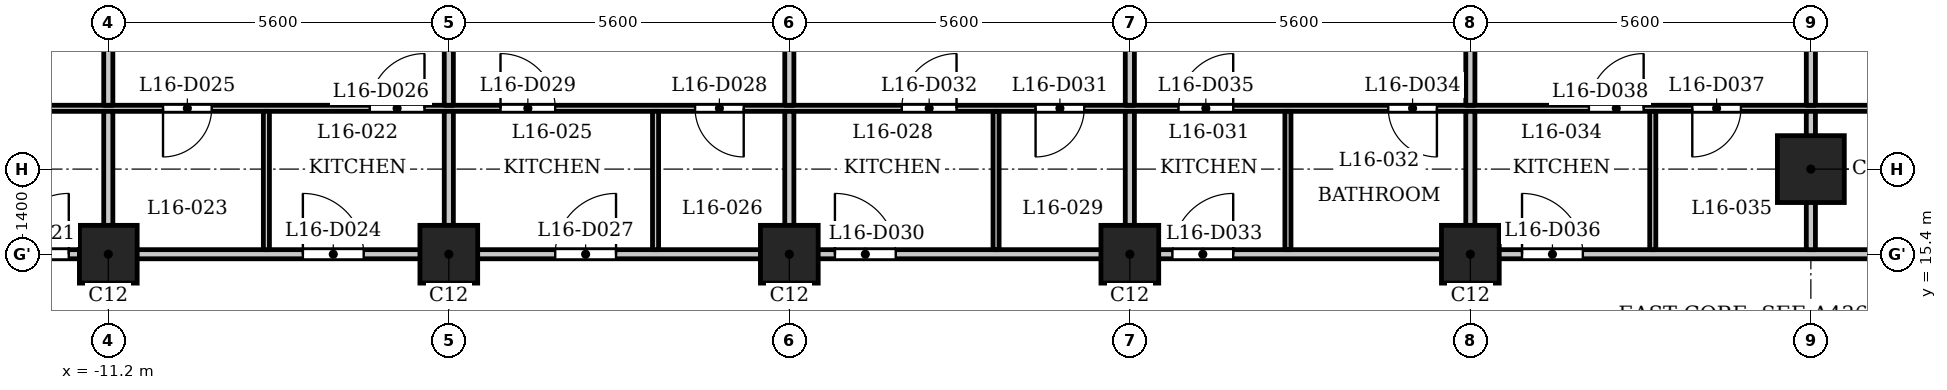
"""IFC4 building model, lengths in metres.
Left out: names, types, materials, properties, quantities, classifications, styles, units other than length and angle.
Written with IfcOpenShell. Run it as: python <this file> out.ifc"""

import sys

from ifc_helpers import new_model, si_unit, direction, frame, frame_2d, origin, origin_2d, place, context, subcontext, project, spatial, rectangle, extrude, element, fill, save


model = new_model("IFC4")
c1 = context("Model", 3, precision=1e-05, world=origin(), true_north=direction((0.0, 1.0)))
c2 = subcontext(c1, "Body", "Model", "MODEL_VIEW")
j1 = project(units=[si_unit("LENGTHUNIT", "METRE"), si_unit("PLANEANGLEUNIT", "RADIAN")], contexts=[c1])
p1 = place(None, origin())
s1 = spatial("IfcSite", under=j1, at=p1, CompositionType="ELEMENT")
p2 = place(p1, origin())
s2 = spatial("IfcBuilding", under=s1, at=p2, CompositionType="ELEMENT")
p3 = place(p2, frame((0.0, 0.0, 65.5)))
s3 = spatial("IfcBuildingStorey", under=s2, at=p3, CompositionType="ELEMENT", Elevation=65.5)
p4 = place(p3, frame((16.8, 16.8, 0.0), z_axis=(0.0, 0.0, 1.0), x_axis=(1.0, 0.0, 0.0)))
e1 = element("IfcColumn", 1, at=p4, inside=s3, PredefinedType="COLUMN", context=c2, shape_type="SweptSolid", body=[
    extrude(rectangle(XDim=1.1, YDim=1.1, at=origin_2d()), origin(), (0.0, 0.0, 1.0), 3.5),
])
for number, where, z_axis, x_axis in (
    (2, (-11.2, 15.4, 0.0), (0.0, 0.0, 1.0), (1.0, 0.0, 0.0)),
    (3, (-5.6, 15.4, 0.0), (0.0, 0.0, 1.0), (1.0, 0.0, 0.0)),
    (4, (0.0, 15.4, 0.0), (0.0, 0.0, 1.0), (1.0, 0.0, 0.0)),
    (5, (5.6, 15.4, 0.0), (0.0, 0.0, 1.0), (1.0, 0.0, 0.0)),
    (6, (11.2, 15.4, 0.0), (0.0, 0.0, 1.0), (1.0, 0.0, 0.0)),
):
    element("IfcColumn", number, at=place(p3, frame(where, z_axis=z_axis, x_axis=x_axis)), inside=s3, PredefinedType="COLUMN", context=c2, shape_type="SweptSolid", body=[
        extrude(rectangle(XDim=0.95, YDim=0.95, at=origin_2d()), origin(), (0.0, 0.0, 1.0), 3.5),
    ])
p5 = place(p3, frame((-27.484, 15.4, 0.0), z_axis=(0.0, 0.0, 1.0), x_axis=(1.0, 0.0, 0.0)))
e7 = element("IfcWall", 7, at=p5, inside=s3, PredefinedType="PARTITIONING", context=c2, shape_type="SweptSolid", body=[
    extrude(rectangle(XDim=54.968, YDim=0.15, at=frame_2d((27.484, 0.0))), origin(), (0.0, 0.0, 1.0), 3.2),
])
p6 = place(p5, frame((8.784, 0.0, 0.0)))
e8 = element("IfcOpeningElement", 8, at=p6, cuts=e7, PredefinedType="OPENING", context=c2, shape_type="SweptSolid", body=[
    extrude(rectangle(XDim=1.0, YDim=2.1, at=frame_2d((0.5, 1.05))), frame((0.0, 0.085, 0.0), z_axis=(0.0, -1.0, 0.0), x_axis=(1.0, 0.0, 0.0)), (0.0, 0.0, 1.0), 0.17),
])
p7 = place(p5, frame((14.634, 0.0, 0.0)))
e9 = element("IfcOpeningElement", 9, at=p7, cuts=e7, PredefinedType="OPENING", context=c2, shape_type="SweptSolid", body=[
    extrude(rectangle(XDim=1.0, YDim=2.1, at=frame_2d((0.5, 1.05))), frame((0.0, 0.085, 0.0), z_axis=(0.0, -1.0, 0.0), x_axis=(1.0, 0.0, 0.0)), (0.0, 0.0, 1.0), 0.17),
])
p8 = place(p5, frame((19.484, 0.0, 0.0)))
e10 = element("IfcOpeningElement", 10, at=p8, cuts=e7, PredefinedType="OPENING", context=c2, shape_type="SweptSolid", body=[
    extrude(rectangle(XDim=1.0, YDim=2.1, at=frame_2d((0.5, 1.05))), frame((0.0, 0.085, 0.0), z_axis=(0.0, -1.0, 0.0), x_axis=(1.0, 0.0, 0.0)), (0.0, 0.0, 1.0), 0.17),
])
p9 = place(p5, frame((23.634, 0.0, 0.0)))
e11 = element("IfcOpeningElement", 11, at=p9, cuts=e7, PredefinedType="OPENING", context=c2, shape_type="SweptSolid", body=[
    extrude(rectangle(XDim=1.0, YDim=2.1, at=frame_2d((0.5, 1.05))), frame((0.0, 0.085, 0.0), z_axis=(0.0, -1.0, 0.0), x_axis=(1.0, 0.0, 0.0)), (0.0, 0.0, 1.0), 0.17),
])
p10 = place(p5, frame((28.234, 0.0, 0.0)))
e12 = element("IfcOpeningElement", 12, at=p10, cuts=e7, PredefinedType="OPENING", context=c2, shape_type="SweptSolid", body=[
    extrude(rectangle(XDim=1.0, YDim=2.1, at=frame_2d((0.5, 1.05))), frame((0.0, 0.085, 0.0), z_axis=(0.0, -1.0, 0.0), x_axis=(1.0, 0.0, 0.0)), (0.0, 0.0, 1.0), 0.17),
])
p11 = place(p5, frame((33.784, 0.0, 0.0)))
e13 = element("IfcOpeningElement", 13, at=p11, cuts=e7, PredefinedType="OPENING", context=c2, shape_type="SweptSolid", body=[
    extrude(rectangle(XDim=1.0, YDim=2.1, at=frame_2d((0.5, 1.05))), frame((0.0, 0.085, 0.0), z_axis=(0.0, -1.0, 0.0), x_axis=(1.0, 0.0, 0.0)), (0.0, 0.0, 1.0), 0.17),
])
p12 = place(p5, frame((39.534, 0.0, 0.0)))
e14 = element("IfcOpeningElement", 14, at=p12, cuts=e7, PredefinedType="OPENING", context=c2, shape_type="SweptSolid", body=[
    extrude(rectangle(XDim=1.0, YDim=2.1, at=frame_2d((0.5, 1.05))), frame((0.0, 0.085, 0.0), z_axis=(0.0, -1.0, 0.0), x_axis=(1.0, 0.0, 0.0)), (0.0, 0.0, 1.0), 0.17),
])
p13 = place(p5, frame((48.234, 0.0, 0.0)))
e15 = element("IfcOpeningElement", 15, at=p13, cuts=e7, PredefinedType="OPENING", context=c2, shape_type="SweptSolid", body=[
    extrude(rectangle(XDim=1.0, YDim=2.1, at=frame_2d((0.5, 1.05))), frame((0.0, 0.085, 0.0), z_axis=(0.0, -1.0, 0.0), x_axis=(1.0, 0.0, 0.0)), (0.0, 0.0, 1.0), 0.17),
])
p14 = place(p3, frame((-26.64, 17.8, 0.0), z_axis=(0.0, 0.0, 1.0), x_axis=(1.0, 0.0, 0.0)))
e16 = element("IfcWall", 16, at=p14, inside=s3, PredefinedType="PARTITIONING", context=c2, shape_type="SweptSolid", body=[
    extrude(rectangle(XDim=53.034, YDim=0.1, at=frame_2d((26.517, 0.0))), origin(), (0.0, 0.0, 1.0), 3.2),
])
p15 = place(p14, frame((2.872, 0.0, 0.0)))
e17 = element("IfcOpeningElement", 17, at=p15, cuts=e16, PredefinedType="OPENING", context=c2, shape_type="SweptSolid", body=[
    extrude(rectangle(XDim=0.8, YDim=2.1, at=frame_2d((0.4, 1.05))), frame((0.0, 0.06, 0.0), z_axis=(0.0, -1.0, 0.0), x_axis=(1.0, 0.0, 0.0)), (0.0, 0.0, 1.0), 0.12),
])
p16 = place(p14, frame((7.04, 0.0, 0.0)))
e18 = element("IfcOpeningElement", 18, at=p16, cuts=e16, PredefinedType="OPENING", context=c2, shape_type="SweptSolid", body=[
    extrude(rectangle(XDim=0.9, YDim=2.1, at=frame_2d((0.45, 1.05))), frame((0.0, 0.06, 0.0), z_axis=(0.0, -1.0, 0.0), x_axis=(1.0, 0.0, 0.0)), (0.0, 0.0, 1.0), 0.12),
])
p17 = place(p14, frame((10.74, 0.0, 0.0)))
e19 = element("IfcOpeningElement", 19, at=p17, cuts=e16, PredefinedType="OPENING", context=c2, shape_type="SweptSolid", body=[
    extrude(rectangle(XDim=0.8, YDim=2.1, at=frame_2d((0.4, 1.05))), frame((0.0, 0.06, 0.0), z_axis=(0.0, -1.0, 0.0), x_axis=(1.0, 0.0, 0.0)), (0.0, 0.0, 1.0), 0.12),
])
p18 = place(p14, frame((12.89, 0.0, 0.0)))
e20 = element("IfcOpeningElement", 20, at=p18, cuts=e16, PredefinedType="OPENING", context=c2, shape_type="SweptSolid", body=[
    extrude(rectangle(XDim=0.9, YDim=2.1, at=frame_2d((0.45, 1.05))), frame((0.0, 0.06, 0.0), z_axis=(0.0, -1.0, 0.0), x_axis=(1.0, 0.0, 0.0)), (0.0, 0.0, 1.0), 0.12),
])
p19 = place(p14, frame((16.34, 0.0, 0.0)))
e21 = element("IfcOpeningElement", 21, at=p19, cuts=e16, PredefinedType="OPENING", context=c2, shape_type="SweptSolid", body=[
    extrude(rectangle(XDim=0.8, YDim=2.1, at=frame_2d((0.4, 1.05))), frame((0.0, 0.06, 0.0), z_axis=(0.0, -1.0, 0.0), x_axis=(1.0, 0.0, 0.0)), (0.0, 0.0, 1.0), 0.12),
])
p20 = place(p14, frame((19.74, 0.0, 0.0)))
e22 = element("IfcOpeningElement", 22, at=p20, cuts=e16, PredefinedType="OPENING", context=c2, shape_type="SweptSolid", body=[
    extrude(rectangle(XDim=0.9, YDim=2.1, at=frame_2d((0.45, 1.05))), frame((0.0, 0.06, 0.0), z_axis=(0.0, -1.0, 0.0), x_axis=(1.0, 0.0, 0.0)), (0.0, 0.0, 1.0), 0.12),
])
p21 = place(p14, frame((25.09, 0.0, 0.0)))
e23 = element("IfcOpeningElement", 23, at=p21, cuts=e16, PredefinedType="OPENING", context=c2, shape_type="SweptSolid", body=[
    extrude(rectangle(XDim=0.8, YDim=2.1, at=frame_2d((0.4, 1.05))), frame((0.0, 0.06, 0.0), z_axis=(0.0, -1.0, 0.0), x_axis=(1.0, 0.0, 0.0)), (0.0, 0.0, 1.0), 0.12),
])
p22 = place(p14, frame((21.89, 0.0, 0.0)))
e24 = element("IfcOpeningElement", 24, at=p22, cuts=e16, PredefinedType="OPENING", context=c2, shape_type="SweptSolid", body=[
    extrude(rectangle(XDim=0.9, YDim=2.1, at=frame_2d((0.45, 1.05))), frame((0.0, 0.06, 0.0), z_axis=(0.0, -1.0, 0.0), x_axis=(1.0, 0.0, 0.0)), (0.0, 0.0, 1.0), 0.12),
])
p23 = place(p14, frame((30.69, 0.0, 0.0)))
e25 = element("IfcOpeningElement", 25, at=p23, cuts=e16, PredefinedType="OPENING", context=c2, shape_type="SweptSolid", body=[
    extrude(rectangle(XDim=0.8, YDim=2.1, at=frame_2d((0.4, 1.05))), frame((0.0, 0.06, 0.0), z_axis=(0.0, -1.0, 0.0), x_axis=(1.0, 0.0, 0.0)), (0.0, 0.0, 1.0), 0.12),
])
p24 = place(p14, frame((28.49, 0.0, 0.0)))
e26 = element("IfcOpeningElement", 26, at=p24, cuts=e16, PredefinedType="OPENING", context=c2, shape_type="SweptSolid", body=[
    extrude(rectangle(XDim=0.9, YDim=2.1, at=frame_2d((0.45, 1.05))), frame((0.0, 0.06, 0.0), z_axis=(0.0, -1.0, 0.0), x_axis=(1.0, 0.0, 0.0)), (0.0, 0.0, 1.0), 0.12),
])
p25 = place(p14, frame((36.49, 0.0, 0.0)))
e27 = element("IfcOpeningElement", 27, at=p25, cuts=e16, PredefinedType="OPENING", context=c2, shape_type="SweptSolid", body=[
    extrude(rectangle(XDim=0.8, YDim=2.1, at=frame_2d((0.4, 1.05))), frame((0.0, 0.06, 0.0), z_axis=(0.0, -1.0, 0.0), x_axis=(1.0, 0.0, 0.0)), (0.0, 0.0, 1.0), 0.12),
])
p26 = place(p14, frame((33.04, 0.0, 0.0)))
e28 = element("IfcOpeningElement", 28, at=p26, cuts=e16, PredefinedType="OPENING", context=c2, shape_type="SweptSolid", body=[
    extrude(rectangle(XDim=0.9, YDim=2.1, at=frame_2d((0.45, 1.05))), frame((0.0, 0.06, 0.0), z_axis=(0.0, -1.0, 0.0), x_axis=(1.0, 0.0, 0.0)), (0.0, 0.0, 1.0), 0.12),
])
p27 = place(p14, frame((41.49, 0.0, 0.0)))
e29 = element("IfcOpeningElement", 29, at=p27, cuts=e16, PredefinedType="OPENING", context=c2, shape_type="SweptSolid", body=[
    extrude(rectangle(XDim=0.8, YDim=2.1, at=frame_2d((0.4, 1.05))), frame((0.0, 0.06, 0.0), z_axis=(0.0, -1.0, 0.0), x_axis=(1.0, 0.0, 0.0)), (0.0, 0.0, 1.0), 0.12),
])
p28 = place(p14, frame((39.79, 0.0, 0.0)))
e30 = element("IfcOpeningElement", 30, at=p28, cuts=e16, PredefinedType="OPENING", context=c2, shape_type="SweptSolid", body=[
    extrude(rectangle(XDim=0.9, YDim=2.1, at=frame_2d((0.45, 1.05))), frame((0.0, 0.06, 0.0), z_axis=(0.0, -1.0, 0.0), x_axis=(1.0, 0.0, 0.0)), (0.0, 0.0, 1.0), 0.12),
])
p29 = place(p14, frame((51.44, 0.0, 0.0)))
e31 = element("IfcOpeningElement", 31, at=p29, cuts=e16, PredefinedType="OPENING", context=c2, shape_type="SweptSolid", body=[
    extrude(rectangle(XDim=0.8, YDim=2.1, at=frame_2d((0.4, 1.05))), frame((0.0, 0.06, 0.0), z_axis=(0.0, -1.0, 0.0), x_axis=(1.0, 0.0, 0.0)), (0.0, 0.0, 1.0), 0.12),
])
p30 = place(p14, frame((46.49, 0.0, 0.0)))
e32 = element("IfcOpeningElement", 32, at=p30, cuts=e16, PredefinedType="OPENING", context=c2, shape_type="SweptSolid", body=[
    extrude(rectangle(XDim=0.9, YDim=2.1, at=frame_2d((0.45, 1.05))), frame((0.0, 0.06, 0.0), z_axis=(0.0, -1.0, 0.0), x_axis=(1.0, 0.0, 0.0)), (0.0, 0.0, 1.0), 0.12),
])
p31 = place(p3, frame((-11.2, 15.475, 0.0), z_axis=(0.0, 0.0, 1.0), x_axis=(0.0, 1.0, 0.0)))
e33 = element("IfcWall", 33, at=p31, inside=s3, PredefinedType="PARTITIONING", context=c2, shape_type="SweptSolid", body=[
    extrude(rectangle(XDim=2.275, YDim=0.15, at=frame_2d((1.137, 0.0))), origin(), (0.0, 0.0, 1.0), 3.2),
])
p32 = place(p3, frame((-11.2, 17.85, 0.0), z_axis=(0.0, 0.0, 1.0), x_axis=(0.0, 1.0, 0.0)))
e34 = element("IfcWall", 34, at=p32, inside=s3, PredefinedType="PARTITIONING", context=c2, shape_type="SweptSolid", body=[
    extrude(rectangle(XDim=5.23, YDim=0.15, at=frame_2d((2.615, 0.0))), origin(), (0.0, 0.0, 1.0), 3.2),
])
p33 = place(p3, frame((-8.6, 15.475, 0.0), z_axis=(0.0, 0.0, 1.0), x_axis=(0.0, 1.0, 0.0)))
e35 = element("IfcWall", 35, at=p33, inside=s3, PredefinedType="PARTITIONING", context=c2, shape_type="SweptSolid", body=[
    extrude(rectangle(XDim=2.275, YDim=0.1, at=frame_2d((1.137, 0.0))), origin(), (0.0, 0.0, 1.0), 3.2),
])
p34 = place(p3, frame((-5.6, 15.475, 0.0), z_axis=(0.0, 0.0, 1.0), x_axis=(0.0, 1.0, 0.0)))
e36 = element("IfcWall", 36, at=p34, inside=s3, PredefinedType="PARTITIONING", context=c2, shape_type="SweptSolid", body=[
    extrude(rectangle(XDim=2.275, YDim=0.15, at=frame_2d((1.137, 0.0))), origin(), (0.0, 0.0, 1.0), 3.2),
])
p35 = place(p3, frame((-5.6, 17.85, 0.0), z_axis=(0.0, 0.0, 1.0), x_axis=(0.0, 1.0, 0.0)))
e37 = element("IfcWall", 37, at=p35, inside=s3, PredefinedType="PARTITIONING", context=c2, shape_type="SweptSolid", body=[
    extrude(rectangle(XDim=5.23, YDim=0.15, at=frame_2d((2.615, 0.0))), origin(), (0.0, 0.0, 1.0), 3.2),
])
p36 = place(p3, frame((-2.2, 15.475, 0.0), z_axis=(0.0, 0.0, 1.0), x_axis=(0.0, 1.0, 0.0)))
e38 = element("IfcWall", 38, at=p36, inside=s3, PredefinedType="PARTITIONING", context=c2, shape_type="SweptSolid", body=[
    extrude(rectangle(XDim=2.275, YDim=0.1, at=frame_2d((1.137, 0.0))), origin(), (0.0, 0.0, 1.0), 3.2),
])
p37 = place(p3, frame((0.0, 15.475, 0.0), z_axis=(0.0, 0.0, 1.0), x_axis=(0.0, 1.0, 0.0)))
e39 = element("IfcWall", 39, at=p37, inside=s3, PredefinedType="PARTITIONING", context=c2, shape_type="SweptSolid", body=[
    extrude(rectangle(XDim=2.275, YDim=0.15, at=frame_2d((1.137, 0.0))), origin(), (0.0, 0.0, 1.0), 3.2),
])
p38 = place(p3, frame((0.0, 17.85, 0.0), z_axis=(0.0, 0.0, 1.0), x_axis=(0.0, 1.0, 0.0)))
e40 = element("IfcWall", 40, at=p38, inside=s3, PredefinedType="PARTITIONING", context=c2, shape_type="SweptSolid", body=[
    extrude(rectangle(XDim=5.23, YDim=0.15, at=frame_2d((2.615, 0.0))), origin(), (0.0, 0.0, 1.0), 3.2),
])
p39 = place(p3, frame((3.4, 15.475, 0.0), z_axis=(0.0, 0.0, 1.0), x_axis=(0.0, 1.0, 0.0)))
e41 = element("IfcWall", 41, at=p39, inside=s3, PredefinedType="PARTITIONING", context=c2, shape_type="SweptSolid", body=[
    extrude(rectangle(XDim=2.275, YDim=0.1, at=frame_2d((1.137, 0.0))), origin(), (0.0, 0.0, 1.0), 3.2),
])
p40 = place(p3, frame((5.6, 15.475, 0.0), z_axis=(0.0, 0.0, 1.0), x_axis=(0.0, 1.0, 0.0)))
e42 = element("IfcWall", 42, at=p40, inside=s3, PredefinedType="PARTITIONING", context=c2, shape_type="SweptSolid", body=[
    extrude(rectangle(XDim=2.275, YDim=0.15, at=frame_2d((1.137, 0.0))), origin(), (0.0, 0.0, 1.0), 3.2),
])
p41 = place(p3, frame((5.6, 17.85, 0.0), z_axis=(0.0, 0.0, 1.0), x_axis=(0.0, 1.0, 0.0)))
e43 = element("IfcWall", 43, at=p41, inside=s3, PredefinedType="PARTITIONING", context=c2, shape_type="SweptSolid", body=[
    extrude(rectangle(XDim=5.23, YDim=0.15, at=frame_2d((2.615, 0.0))), origin(), (0.0, 0.0, 1.0), 3.2),
])
p42 = place(p3, frame((8.2, 15.475, 0.0), z_axis=(0.0, 0.0, 1.0), x_axis=(0.0, 1.0, 0.0)))
e44 = element("IfcWall", 44, at=p42, inside=s3, PredefinedType="PARTITIONING", context=c2, shape_type="SweptSolid", body=[
    extrude(rectangle(XDim=2.275, YDim=0.1, at=frame_2d((1.137, 0.0))), origin(), (0.0, 0.0, 1.0), 3.2),
])
p43 = place(p3, frame((11.2, 15.475, 0.0), z_axis=(0.0, 0.0, 1.0), x_axis=(0.0, 1.0, 0.0)))
e45 = element("IfcWall", 45, at=p43, inside=s3, PredefinedType="PARTITIONING", context=c2, shape_type="SweptSolid", body=[
    extrude(rectangle(XDim=2.275, YDim=0.15, at=frame_2d((1.137, 0.0))), origin(), (0.0, 0.0, 1.0), 3.2),
])
p44 = place(p3, frame((11.2, 17.85, 0.0), z_axis=(0.0, 0.0, 1.0), x_axis=(0.0, 1.0, 0.0)))
e46 = element("IfcWall", 46, at=p44, inside=s3, PredefinedType="PARTITIONING", context=c2, shape_type="SweptSolid", body=[
    extrude(rectangle(XDim=5.23, YDim=0.15, at=frame_2d((2.615, 0.0))), origin(), (0.0, 0.0, 1.0), 3.2),
])
p45 = place(p3, frame((14.2, 15.475, 0.0), z_axis=(0.0, 0.0, 1.0), x_axis=(0.0, 1.0, 0.0)))
e47 = element("IfcWall", 47, at=p45, inside=s3, PredefinedType="PARTITIONING", context=c2, shape_type="SweptSolid", body=[
    extrude(rectangle(XDim=2.275, YDim=0.1, at=frame_2d((1.137, 0.0))), origin(), (0.0, 0.0, 1.0), 3.2),
])
p46 = place(p3, frame((16.8, 15.475, 0.0), z_axis=(0.0, 0.0, 1.0), x_axis=(0.0, 1.0, 0.0)))
e48 = element("IfcWall", 48, at=p46, inside=s3, PredefinedType="PARTITIONING", context=c2, shape_type="SweptSolid", body=[
    extrude(rectangle(XDim=2.275, YDim=0.15, at=frame_2d((1.137, 0.0))), origin(), (0.0, 0.0, 1.0), 3.2),
])
p47 = place(p3, frame((16.8, 17.85, 0.0), z_axis=(0.0, 0.0, 1.0), x_axis=(0.0, 1.0, 0.0)))
e49 = element("IfcWall", 49, at=p47, inside=s3, PredefinedType="PARTITIONING", context=c2, shape_type="SweptSolid", body=[
    extrude(rectangle(XDim=5.23, YDim=0.15, at=frame_2d((2.615, 0.0))), origin(), (0.0, 0.0, 1.0), 3.2),
])
p48 = place(p7, origin())
e50 = element("IfcDoor", 50, at=p48, inside=s3, OperationType="SINGLE_SWING_LEFT", PredefinedType="DOOR", context=c2, shape_type="SweptSolid", body=[
    extrude(rectangle(XDim=1.0, YDim=2.1, at=frame_2d((0.5, 1.05))), frame((0.0, 0.025, 0.0), z_axis=(0.0, -1.0, 0.0), x_axis=(1.0, 0.0, 0.0)), (0.0, 0.0, 1.0), 0.05),
])
fill(e9, e50)
p49 = place(p8, origin())
e51 = element("IfcDoor", 51, at=p49, inside=s3, OperationType="SINGLE_SWING_RIGHT", PredefinedType="DOOR", context=c2, shape_type="SweptSolid", body=[
    extrude(rectangle(XDim=1.0, YDim=2.1, at=frame_2d((0.5, 1.05))), frame((0.0, 0.025, 0.0), z_axis=(0.0, -1.0, 0.0), x_axis=(1.0, 0.0, 0.0)), (0.0, 0.0, 1.0), 0.05),
])
fill(e10, e51)
p50 = place(p19, origin())
e52 = element("IfcDoor", 52, at=p50, inside=s3, OperationType="SINGLE_SWING_LEFT", PredefinedType="DOOR", context=c2, shape_type="SweptSolid", body=[
    extrude(rectangle(XDim=0.8, YDim=2.1, at=frame_2d((0.4, 1.05))), frame((0.0, 0.025, 0.0), z_axis=(0.0, -1.0, 0.0), x_axis=(1.0, 0.0, 0.0)), (0.0, 0.0, 1.0), 0.05),
])
fill(e21, e52)
p51 = place(p20, origin())
e53 = element("IfcDoor", 53, at=p51, inside=s3, OperationType="SINGLE_SWING_LEFT", PredefinedType="DOOR", context=c2, shape_type="SweptSolid", body=[
    extrude(rectangle(XDim=0.9, YDim=2.1, at=frame_2d((0.45, 1.05))), frame((0.0, 0.025, 0.0), z_axis=(0.0, -1.0, 0.0), x_axis=(1.0, 0.0, 0.0)), (0.0, 0.0, 1.0), 0.05),
])
fill(e22, e53)
p52 = place(p9, origin())
e54 = element("IfcDoor", 54, at=p52, inside=s3, OperationType="SINGLE_SWING_LEFT", PredefinedType="DOOR", context=c2, shape_type="SweptSolid", body=[
    extrude(rectangle(XDim=1.0, YDim=2.1, at=frame_2d((0.5, 1.05))), frame((0.0, 0.025, 0.0), z_axis=(0.0, -1.0, 0.0), x_axis=(1.0, 0.0, 0.0)), (0.0, 0.0, 1.0), 0.05),
])
fill(e11, e54)
p53 = place(p21, origin())
e55 = element("IfcDoor", 55, at=p53, inside=s3, OperationType="SINGLE_SWING_RIGHT", PredefinedType="DOOR", context=c2, shape_type="SweptSolid", body=[
    extrude(rectangle(XDim=0.8, YDim=2.1, at=frame_2d((0.4, 1.05))), frame((0.0, 0.025, 0.0), z_axis=(0.0, -1.0, 0.0), x_axis=(1.0, 0.0, 0.0)), (0.0, 0.0, 1.0), 0.05),
])
fill(e23, e55)
p54 = place(p22, origin())
e56 = element("IfcDoor", 56, at=p54, inside=s3, OperationType="SINGLE_SWING_RIGHT", PredefinedType="DOOR", context=c2, shape_type="SweptSolid", body=[
    extrude(rectangle(XDim=0.9, YDim=2.1, at=frame_2d((0.45, 1.05))), frame((0.0, 0.025, 0.0), z_axis=(0.0, -1.0, 0.0), x_axis=(1.0, 0.0, 0.0)), (0.0, 0.0, 1.0), 0.05),
])
fill(e24, e56)
p55 = place(p10, origin())
e57 = element("IfcDoor", 57, at=p55, inside=s3, OperationType="SINGLE_SWING_RIGHT", PredefinedType="DOOR", context=c2, shape_type="SweptSolid", body=[
    extrude(rectangle(XDim=1.0, YDim=2.1, at=frame_2d((0.5, 1.05))), frame((0.0, 0.025, 0.0), z_axis=(0.0, -1.0, 0.0), x_axis=(1.0, 0.0, 0.0)), (0.0, 0.0, 1.0), 0.05),
])
fill(e12, e57)
p56 = place(p23, origin())
e58 = element("IfcDoor", 58, at=p56, inside=s3, OperationType="SINGLE_SWING_LEFT", PredefinedType="DOOR", context=c2, shape_type="SweptSolid", body=[
    extrude(rectangle(XDim=0.8, YDim=2.1, at=frame_2d((0.4, 1.05))), frame((0.0, 0.025, 0.0), z_axis=(0.0, -1.0, 0.0), x_axis=(1.0, 0.0, 0.0)), (0.0, 0.0, 1.0), 0.05),
])
fill(e25, e58)
p57 = place(p24, origin())
e59 = element("IfcDoor", 59, at=p57, inside=s3, OperationType="SINGLE_SWING_LEFT", PredefinedType="DOOR", context=c2, shape_type="SweptSolid", body=[
    extrude(rectangle(XDim=0.9, YDim=2.1, at=frame_2d((0.45, 1.05))), frame((0.0, 0.025, 0.0), z_axis=(0.0, -1.0, 0.0), x_axis=(1.0, 0.0, 0.0)), (0.0, 0.0, 1.0), 0.05),
])
fill(e26, e59)
p58 = place(p11, origin())
e60 = element("IfcDoor", 60, at=p58, inside=s3, OperationType="SINGLE_SWING_LEFT", PredefinedType="DOOR", context=c2, shape_type="SweptSolid", body=[
    extrude(rectangle(XDim=1.0, YDim=2.1, at=frame_2d((0.5, 1.05))), frame((0.0, 0.025, 0.0), z_axis=(0.0, -1.0, 0.0), x_axis=(1.0, 0.0, 0.0)), (0.0, 0.0, 1.0), 0.05),
])
fill(e13, e60)
p59 = place(p25, origin())
e61 = element("IfcDoor", 61, at=p59, inside=s3, OperationType="SINGLE_SWING_RIGHT", PredefinedType="DOOR", context=c2, shape_type="SweptSolid", body=[
    extrude(rectangle(XDim=0.8, YDim=2.1, at=frame_2d((0.4, 1.05))), frame((0.0, 0.025, 0.0), z_axis=(0.0, -1.0, 0.0), x_axis=(1.0, 0.0, 0.0)), (0.0, 0.0, 1.0), 0.05),
])
fill(e27, e61)
p60 = place(p26, origin())
e62 = element("IfcDoor", 62, at=p60, inside=s3, OperationType="SINGLE_SWING_LEFT", PredefinedType="DOOR", context=c2, shape_type="SweptSolid", body=[
    extrude(rectangle(XDim=0.9, YDim=2.1, at=frame_2d((0.45, 1.05))), frame((0.0, 0.025, 0.0), z_axis=(0.0, -1.0, 0.0), x_axis=(1.0, 0.0, 0.0)), (0.0, 0.0, 1.0), 0.05),
])
fill(e28, e62)
p61 = place(p12, origin())
e63 = element("IfcDoor", 63, at=p61, inside=s3, OperationType="SINGLE_SWING_RIGHT", PredefinedType="DOOR", context=c2, shape_type="SweptSolid", body=[
    extrude(rectangle(XDim=1.0, YDim=2.1, at=frame_2d((0.5, 1.05))), frame((0.0, 0.025, 0.0), z_axis=(0.0, -1.0, 0.0), x_axis=(1.0, 0.0, 0.0)), (0.0, 0.0, 1.0), 0.05),
])
fill(e14, e63)
p62 = place(p27, origin())
e64 = element("IfcDoor", 64, at=p62, inside=s3, OperationType="SINGLE_SWING_LEFT", PredefinedType="DOOR", context=c2, shape_type="SweptSolid", body=[
    extrude(rectangle(XDim=0.8, YDim=2.1, at=frame_2d((0.4, 1.05))), frame((0.0, 0.025, 0.0), z_axis=(0.0, -1.0, 0.0), x_axis=(1.0, 0.0, 0.0)), (0.0, 0.0, 1.0), 0.05),
])
fill(e29, e64)
p63 = place(p28, origin())
e65 = element("IfcDoor", 65, at=p63, inside=s3, OperationType="SINGLE_SWING_LEFT", PredefinedType="DOOR", context=c2, shape_type="SweptSolid", body=[
    extrude(rectangle(XDim=0.9, YDim=2.1, at=frame_2d((0.45, 1.05))), frame((0.0, 0.025, 0.0), z_axis=(0.0, -1.0, 0.0), x_axis=(1.0, 0.0, 0.0)), (0.0, 0.0, 1.0), 0.05),
])
fill(e30, e65)
save(model, sys.argv[1])
